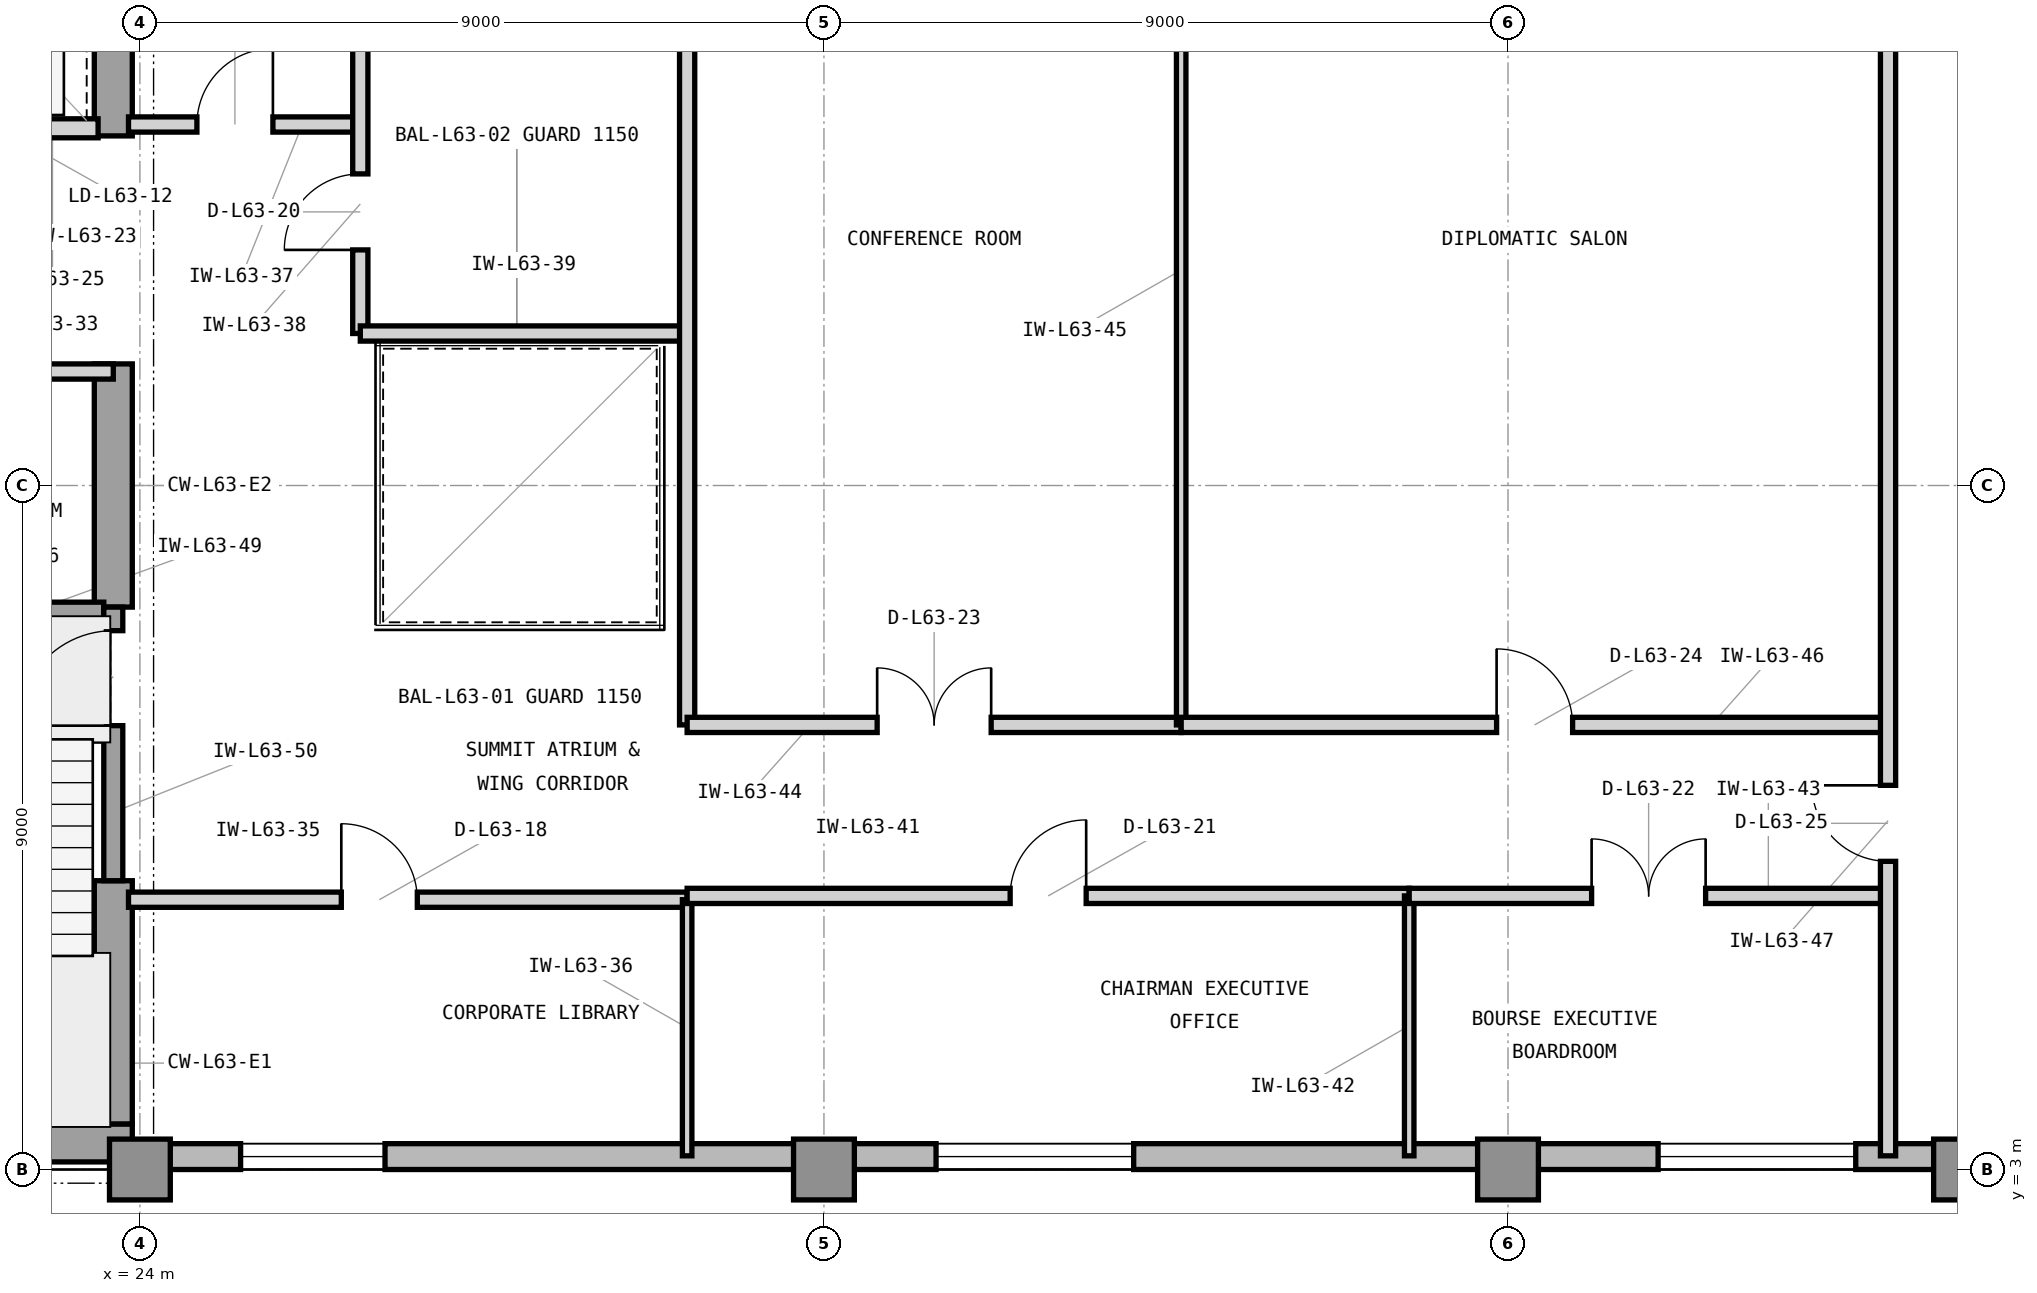
"""IFC4 building model, lengths in metres.
Left out: names, types, materials, properties, quantities, classifications, styles, units other than length and angle.
Written with IfcOpenShell. Run it as: python <this file> out.ifc"""

import sys

from ifc_helpers import new_model, si_unit, direction, frame, frame_2d, origin, origin_2d, place, context, subcontext, project, spatial, rectangle, extrude, element, fill, save


model = new_model("IFC4")
c1 = context("Model", 3, precision=1e-05, world=origin(), true_north=direction((0.0, 1.0)))
c2 = subcontext(c1, "Body", "Model", "MODEL_VIEW")
j1 = project(units=[si_unit("LENGTHUNIT", "METRE"), si_unit("PLANEANGLEUNIT", "RADIAN")], contexts=[c1])
p1 = place(None, origin())
s1 = spatial("IfcSite", under=j1, at=p1, CompositionType="ELEMENT")
p2 = place(p1, origin())
s2 = spatial("IfcBuilding", under=s1, at=p2, CompositionType="ELEMENT")
p3 = place(p2, frame((0.0, 0.0, 258.6)))
s3 = spatial("IfcBuildingStorey", under=s2, at=p3, CompositionType="ELEMENT", Elevation=258.6)
p4 = place(p3, frame((7.475, 3.35, 0.0), z_axis=(0.0, 0.0, 1.0), x_axis=(1.0, 0.0, 0.0)))
e1 = element("IfcWall", 1, at=p4, inside=s3, PredefinedType="SHEAR", context=c2, shape_type="SweptSolid", body=[
    extrude(rectangle(XDim=16.425, YDim=0.5, at=frame_2d((8.212, 0.0))), origin(), (0.0, 0.0, 1.0), 3.9),
])
p5 = place(p3, frame((23.65, 3.6, 0.0), z_axis=(0.0, 0.0, 1.0), x_axis=(0.0, 1.0, 0.0)))
e2 = element("IfcWall", 2, at=p5, inside=s3, PredefinedType="SHEAR", context=c2, shape_type="SweptSolid", body=[
    extrude(rectangle(XDim=3.2, YDim=0.5, at=frame_2d((1.6, 0.0))), origin(), (0.0, 0.0, 1.0), 3.9),
])
p6 = place(p3, frame((23.65, 10.4, 0.0), z_axis=(0.0, 0.0, 1.0), x_axis=(0.0, 1.0, 0.0)))
e3 = element("IfcWall", 3, at=p6, inside=s3, PredefinedType="SHEAR", context=c2, shape_type="SweptSolid", body=[
    extrude(rectangle(XDim=3.2, YDim=0.5, at=frame_2d((1.6, 0.0))), origin(), (0.0, 0.0, 1.0), 3.9),
])
p7 = place(p3, frame((23.65, 16.6, 0.0), z_axis=(0.0, 0.0, 1.0), x_axis=(0.0, 1.0, 0.0)))
e4 = element("IfcWall", 4, at=p7, inside=s3, PredefinedType="SHEAR", context=c2, shape_type="SweptSolid", body=[
    extrude(rectangle(XDim=4.05, YDim=0.5, at=frame_2d((2.025, 0.0))), origin(), (0.0, 0.0, 1.0), 3.9),
])
for number, where, z_axis, x_axis in (
    (5, (24.0, 3.0, 0.0), (0.0, 0.0, 1.0), (1.0, 0.0, 0.0)),
    (6, (33.0, 3.0, 0.0), (0.0, 0.0, 1.0), (1.0, 0.0, 0.0)),
    (7, (42.0, 3.0, 0.0), (0.0, 0.0, 1.0), (1.0, 0.0, 0.0)),
    (8, (48.0, 3.0, 0.0), (0.0, 0.0, 1.0), (1.0, 0.0, 0.0)),
):
    element("IfcColumn", number, at=place(p3, frame(where, z_axis=z_axis, x_axis=x_axis)), inside=s3, PredefinedType="COLUMN", context=c2, shape_type="SweptSolid", body=[
        extrude(rectangle(XDim=0.8, YDim=0.8, at=origin_2d()), origin(), (0.0, 0.0, 1.0), 3.9),
    ])
p8 = place(p3, frame((23.9, 3.17, 0.0), z_axis=(0.0, 0.0, 1.0), x_axis=(1.0, 0.0, 0.0)))
e9 = element("IfcWall", 9, at=p8, inside=s3, PredefinedType="STANDARD", context=c2, shape_type="SweptSolid", body=[
    extrude(rectangle(XDim=28.5, YDim=0.34, at=frame_2d((14.25, 0.0))), origin(), (0.0, 0.0, 1.0), 3.715),
])
p9 = place(p8, frame((1.425, 0.0, 0.8)))
e10 = element("IfcOpeningElement", 10, at=p9, cuts=e9, PredefinedType="OPENING", context=c2, shape_type="SweptSolid", body=[
    extrude(rectangle(XDim=1.9, YDim=2.35, at=frame_2d((0.95, 1.175))), frame((0.0, 0.18, 0.0), z_axis=(0.0, -1.0, 0.0), x_axis=(1.0, 0.0, 0.0)), (0.0, 0.0, 1.0), 0.36),
])
p10 = place(p8, frame((10.575, 0.0, 0.8)))
e11 = element("IfcOpeningElement", 11, at=p10, cuts=e9, PredefinedType="OPENING", context=c2, shape_type="SweptSolid", body=[
    extrude(rectangle(XDim=2.6, YDim=2.35, at=frame_2d((1.3, 1.175))), frame((0.0, 0.18, 0.0), z_axis=(0.0, -1.0, 0.0), x_axis=(1.0, 0.0, 0.0)), (0.0, 0.0, 1.0), 0.36),
])
p11 = place(p8, frame((20.075, 0.0, 0.8)))
e12 = element("IfcOpeningElement", 12, at=p11, cuts=e9, PredefinedType="OPENING", context=c2, shape_type="SweptSolid", body=[
    extrude(rectangle(XDim=2.6, YDim=2.35, at=frame_2d((1.3, 1.175))), frame((0.0, 0.18, 0.0), z_axis=(0.0, -1.0, 0.0), x_axis=(1.0, 0.0, 0.0)), (0.0, 0.0, 1.0), 0.36),
])
p12 = place(p3, frame((21.05, 16.7, 0.0), z_axis=(0.0, 0.0, 1.0), x_axis=(1.0, 0.0, 0.0)))
e13 = element("IfcWall", 13, at=p12, inside=s3, PredefinedType="PARTITIONING", context=c2, shape_type="SweptSolid", body=[
    extrude(rectangle(XDim=2.4, YDim=0.25, at=frame_2d((1.2, 0.0))), origin(), (0.0, 0.0, 1.0), 3.088),
])
p13 = place(p12, frame((0.52, 0.0, 0.0)))
e14 = element("IfcOpeningElement", 14, at=p13, cuts=e13, PredefinedType="OPENING", context=c2, shape_type="SweptSolid", body=[
    extrude(rectangle(XDim=1.15, YDim=2.25, at=frame_2d((0.575, 1.125))), frame((0.0, 0.135, 0.0), z_axis=(0.0, -1.0, 0.0), x_axis=(1.0, 0.0, 0.0)), (0.0, 0.0, 1.0), 0.27),
])
p14 = place(p3, frame((18.5, 13.5, 0.0), z_axis=(0.0, 0.0, 1.0), x_axis=(1.0, 0.0, 0.0)))
e15 = element("IfcWall", 15, at=p14, inside=s3, PredefinedType="PARTITIONING", context=c2, shape_type="SweptSolid", body=[
    extrude(rectangle(XDim=5.15, YDim=0.2, at=frame_2d((2.575, 0.0))), origin(), (0.0, 0.0, 1.0), 3.088),
])
p15 = place(p14, frame((2.1, 0.0, 0.0)))
e16 = element("IfcOpeningElement", 16, at=p15, cuts=e15, PredefinedType="OPENING", context=c2, shape_type="SweptSolid", body=[
    extrude(rectangle(XDim=0.95, YDim=2.1, at=frame_2d((0.475, 1.05))), frame((0.0, 0.11, 0.0), z_axis=(0.0, -1.0, 0.0), x_axis=(1.0, 0.0, 0.0)), (0.0, 0.0, 1.0), 0.22),
])
p16 = place(p3, frame((23.85, 6.55, 0.0), z_axis=(0.0, 0.0, 1.0), x_axis=(1.0, 0.0, 0.0)))
e17 = element("IfcWall", 17, at=p16, inside=s3, PredefinedType="PARTITIONING", context=c2, shape_type="SweptSolid", body=[
    extrude(rectangle(XDim=7.35, YDim=0.2, at=frame_2d((3.675, 0.0))), origin(), (0.0, 0.0, 1.0), 3.705),
])
p17 = place(p16, frame((2.8, 0.0, 0.0)))
e18 = element("IfcOpeningElement", 18, at=p17, cuts=e17, PredefinedType="OPENING", context=c2, shape_type="SweptSolid", body=[
    extrude(rectangle(XDim=1.0, YDim=2.15, at=frame_2d((0.5, 1.075))), frame((0.0, 0.11, 0.0), z_axis=(0.0, -1.0, 0.0), x_axis=(1.0, 0.0, 0.0)), (0.0, 0.0, 1.0), 0.22),
])
p18 = place(p3, frame((31.2, 3.18, 0.0), z_axis=(0.0, 0.0, 1.0), x_axis=(0.0, 1.0, 0.0)))
e19 = element("IfcWall", 19, at=p18, inside=s3, PredefinedType="PARTITIONING", context=c2, shape_type="SweptSolid", body=[
    extrude(rectangle(XDim=3.37, YDim=0.125, at=frame_2d((1.685, 0.0))), origin(), (0.0, 0.0, 1.0), 3.705),
])
p19 = place(p3, frame((23.85, 16.75, 0.0), z_axis=(0.0, 0.0, 1.0), x_axis=(1.0, 0.0, 0.0)))
e20 = element("IfcWall", 20, at=p19, inside=s3, PredefinedType="PARTITIONING", context=c2, shape_type="SweptSolid", body=[
    extrude(rectangle(XDim=3.05, YDim=0.2, at=frame_2d((1.525, 0.0))), origin(), (0.0, 0.0, 1.0), 3.705),
])
p20 = place(p19, frame((0.9, 0.0, 0.0)))
e21 = element("IfcOpeningElement", 21, at=p20, cuts=e20, PredefinedType="OPENING", context=c2, shape_type="SweptSolid", body=[
    extrude(rectangle(XDim=1.0, YDim=2.15, at=frame_2d((0.5, 1.075))), frame((0.0, 0.11, 0.0), z_axis=(0.0, -1.0, 0.0), x_axis=(1.0, 0.0, 0.0)), (0.0, 0.0, 1.0), 0.22),
])
p21 = place(p3, frame((26.9, 14.0, 0.0), z_axis=(0.0, 0.0, 1.0), x_axis=(0.0, 1.0, 0.0)))
e22 = element("IfcWall", 22, at=p21, inside=s3, PredefinedType="PARTITIONING", context=c2, shape_type="SweptSolid", body=[
    extrude(rectangle(XDim=6.82, YDim=0.2, at=frame_2d((3.41, 0.0))), origin(), (0.0, 0.0, 1.0), 3.705),
])
p22 = place(p21, frame((1.1, 0.0, 0.0)))
e23 = element("IfcOpeningElement", 23, at=p22, cuts=e22, PredefinedType="OPENING", context=c2, shape_type="SweptSolid", body=[
    extrude(rectangle(XDim=1.0, YDim=2.15, at=frame_2d((0.5, 1.075))), frame((0.0, 0.11, 0.0), z_axis=(0.0, -1.0, 0.0), x_axis=(1.0, 0.0, 0.0)), (0.0, 0.0, 1.0), 0.22),
])
p23 = place(p3, frame((26.9, 14.0, 0.0), z_axis=(0.0, 0.0, 1.0), x_axis=(1.0, 0.0, 0.0)))
e24 = element("IfcWall", 24, at=p23, inside=s3, PredefinedType="PARTITIONING", context=c2, shape_type="SweptSolid", body=[
    extrude(rectangle(XDim=4.3, YDim=0.2, at=frame_2d((2.15, 0.0))), origin(), (0.0, 0.0, 1.0), 3.705),
])
p24 = place(p3, frame((31.2, 8.85, 0.0), z_axis=(0.0, 0.0, 1.0), x_axis=(0.0, 1.0, 0.0)))
e25 = element("IfcWall", 25, at=p24, inside=s3, PredefinedType="PARTITIONING", context=c2, shape_type="SweptSolid", body=[
    extrude(rectangle(XDim=11.97, YDim=0.2, at=frame_2d((5.985, 0.0))), origin(), (0.0, 0.0, 1.0), 3.705),
])
p25 = place(p3, frame((31.2, 6.6, 0.0), z_axis=(0.0, 0.0, 1.0), x_axis=(1.0, 0.0, 0.0)))
e26 = element("IfcWall", 26, at=p25, inside=s3, PredefinedType="PARTITIONING", context=c2, shape_type="SweptSolid", body=[
    extrude(rectangle(XDim=9.5, YDim=0.2, at=frame_2d((4.75, 0.0))), origin(), (0.0, 0.0, 1.0), 3.705),
])
p26 = place(p25, frame((4.25, 0.0, 0.0)))
e27 = element("IfcOpeningElement", 27, at=p26, cuts=e26, PredefinedType="OPENING", context=c2, shape_type="SweptSolid", body=[
    extrude(rectangle(XDim=1.0, YDim=2.15, at=frame_2d((0.5, 1.075))), frame((0.0, 0.11, 0.0), z_axis=(0.0, -1.0, 0.0), x_axis=(1.0, 0.0, 0.0)), (0.0, 0.0, 1.0), 0.22),
])
p27 = place(p3, frame((40.7, 3.18, 0.0), z_axis=(0.0, 0.0, 1.0), x_axis=(0.0, 1.0, 0.0)))
e28 = element("IfcWall", 28, at=p27, inside=s3, PredefinedType="PARTITIONING", context=c2, shape_type="SweptSolid", body=[
    extrude(rectangle(XDim=3.42, YDim=0.125, at=frame_2d((1.71, 0.0))), origin(), (0.0, 0.0, 1.0), 3.705),
])
p28 = place(p3, frame((40.7, 6.6, 0.0), z_axis=(0.0, 0.0, 1.0), x_axis=(1.0, 0.0, 0.0)))
e29 = element("IfcWall", 29, at=p28, inside=s3, PredefinedType="PARTITIONING", context=c2, shape_type="SweptSolid", body=[
    extrude(rectangle(XDim=6.3, YDim=0.2, at=frame_2d((3.15, 0.0))), origin(), (0.0, 0.0, 1.0), 3.705),
])
p29 = place(p28, frame((2.4, 0.0, 0.0)))
e30 = element("IfcOpeningElement", 30, at=p29, cuts=e29, PredefinedType="OPENING", context=c2, shape_type="SweptSolid", body=[
    extrude(rectangle(XDim=1.5, YDim=2.3, at=frame_2d((0.75, 1.15))), frame((0.0, 0.11, 0.0), z_axis=(0.0, -1.0, 0.0), x_axis=(1.0, 0.0, 0.0)), (0.0, 0.0, 1.0), 0.22),
])
p30 = place(p3, frame((31.2, 8.85, 0.0), z_axis=(0.0, 0.0, 1.0), x_axis=(1.0, 0.0, 0.0)))
e31 = element("IfcWall", 31, at=p30, inside=s3, PredefinedType="PARTITIONING", context=c2, shape_type="SweptSolid", body=[
    extrude(rectangle(XDim=6.5, YDim=0.2, at=frame_2d((3.25, 0.0))), origin(), (0.0, 0.0, 1.0), 3.705),
])
p31 = place(p30, frame((2.5, 0.0, 0.0)))
e32 = element("IfcOpeningElement", 32, at=p31, cuts=e31, PredefinedType="OPENING", context=c2, shape_type="SweptSolid", body=[
    extrude(rectangle(XDim=1.5, YDim=2.3, at=frame_2d((0.75, 1.15))), frame((0.0, 0.11, 0.0), z_axis=(0.0, -1.0, 0.0), x_axis=(1.0, 0.0, 0.0)), (0.0, 0.0, 1.0), 0.22),
])
p32 = place(p3, frame((37.7, 8.85, 0.0), z_axis=(0.0, 0.0, 1.0), x_axis=(0.0, 1.0, 0.0)))
e33 = element("IfcWall", 33, at=p32, inside=s3, PredefinedType="PARTITIONING", context=c2, shape_type="SweptSolid", body=[
    extrude(rectangle(XDim=11.97, YDim=0.125, at=frame_2d((5.985, 0.0))), origin(), (0.0, 0.0, 1.0), 3.705),
])
p33 = place(p3, frame((37.7, 8.85, 0.0), z_axis=(0.0, 0.0, 1.0), x_axis=(1.0, 0.0, 0.0)))
e34 = element("IfcWall", 34, at=p33, inside=s3, PredefinedType="PARTITIONING", context=c2, shape_type="SweptSolid", body=[
    extrude(rectangle(XDim=9.3, YDim=0.2, at=frame_2d((4.65, 0.0))), origin(), (0.0, 0.0, 1.0), 3.705),
])
p34 = place(p33, frame((4.15, 0.0, 0.0)))
e35 = element("IfcOpeningElement", 35, at=p34, cuts=e34, PredefinedType="OPENING", context=c2, shape_type="SweptSolid", body=[
    extrude(rectangle(XDim=1.0, YDim=2.15, at=frame_2d((0.5, 1.075))), frame((0.0, 0.11, 0.0), z_axis=(0.0, -1.0, 0.0), x_axis=(1.0, 0.0, 0.0)), (0.0, 0.0, 1.0), 0.22),
])
p35 = place(p3, frame((47.0, 3.18, 0.0), z_axis=(0.0, 0.0, 1.0), x_axis=(0.0, 1.0, 0.0)))
e36 = element("IfcWall", 36, at=p35, inside=s3, PredefinedType="PARTITIONING", context=c2, shape_type="SweptSolid", body=[
    extrude(rectangle(XDim=17.64, YDim=0.2, at=frame_2d((8.82, 0.0))), origin(), (0.0, 0.0, 1.0), 3.705),
])
p36 = place(p35, frame((3.875, 0.0, 0.0)))
e37 = element("IfcOpeningElement", 37, at=p36, cuts=e36, PredefinedType="OPENING", context=c2, shape_type="SweptSolid", body=[
    extrude(rectangle(XDim=1.0, YDim=2.15, at=frame_2d((0.5, 1.075))), frame((0.0, 0.11, 0.0), z_axis=(0.0, -1.0, 0.0), x_axis=(1.0, 0.0, 0.0)), (0.0, 0.0, 1.0), 0.22),
])
p37 = place(p3, frame((19.705, 10.34, 0.0), z_axis=(0.0, 0.0, 1.0), x_axis=(1.0, 0.0, 0.0)))
e38 = element("IfcWall", 38, at=p37, inside=s3, PredefinedType="SHEAR", context=c2, shape_type="SweptSolid", body=[
    extrude(rectangle(XDim=3.82, YDim=0.25, at=frame_2d((1.91, 0.0))), origin(), (0.0, 0.0, 1.0), 3.9),
])
p38 = place(p3, frame((23.65, 6.8, 0.0), z_axis=(0.0, 0.0, 1.0), x_axis=(0.0, 1.0, 0.0)))
e39 = element("IfcWall", 39, at=p38, inside=s3, PredefinedType="SHEAR", context=c2, shape_type="SweptSolid", body=[
    extrude(rectangle(XDim=3.6, YDim=0.25, at=frame_2d((1.8, 0.0))), origin(), (0.0, 0.0, 1.0), 3.9),
])
p39 = place(p38, frame((2.04, 0.0, 0.0)))
e40 = element("IfcOpeningElement", 40, at=p39, cuts=e39, PredefinedType="OPENING", context=c2, shape_type="SweptSolid", body=[
    extrude(rectangle(XDim=1.25, YDim=2.2, at=frame_2d((0.625, 1.1))), frame((0.0, 0.135, 0.0), z_axis=(0.0, -1.0, 0.0), x_axis=(1.0, 0.0, 0.0)), (0.0, 0.0, 1.0), 0.27),
])
p40 = place(p9, origin())
e41 = element("IfcWindow", 41, at=p40, inside=s3, PartitioningType="SINGLE_PANEL", PredefinedType="WINDOW", context=c2, shape_type="SweptSolid", body=[
    extrude(rectangle(XDim=1.9, YDim=2.35, at=frame_2d((0.95, 1.175))), frame((0.0, 0.11, 0.0), z_axis=(0.0, -1.0, 0.0), x_axis=(1.0, 0.0, 0.0)), (0.0, 0.0, 1.0), 0.06),
])
fill(e10, e41)
p41 = place(p10, origin())
e42 = element("IfcWindow", 42, at=p41, inside=s3, PartitioningType="SINGLE_PANEL", PredefinedType="WINDOW", context=c2, shape_type="SweptSolid", body=[
    extrude(rectangle(XDim=2.6, YDim=2.35, at=frame_2d((1.3, 1.175))), frame((0.0, 0.11, 0.0), z_axis=(0.0, -1.0, 0.0), x_axis=(1.0, 0.0, 0.0)), (0.0, 0.0, 1.0), 0.06),
])
fill(e11, e42)
p42 = place(p11, origin())
e43 = element("IfcWindow", 43, at=p42, inside=s3, PartitioningType="SINGLE_PANEL", PredefinedType="WINDOW", context=c2, shape_type="SweptSolid", body=[
    extrude(rectangle(XDim=2.6, YDim=2.35, at=frame_2d((1.3, 1.175))), frame((0.0, 0.11, 0.0), z_axis=(0.0, -1.0, 0.0), x_axis=(1.0, 0.0, 0.0)), (0.0, 0.0, 1.0), 0.06),
])
fill(e12, e43)
p43 = place(p17, origin())
e44 = element("IfcDoor", 44, at=p43, inside=s3, OperationType="SINGLE_SWING_LEFT", PredefinedType="DOOR", context=c2, shape_type="SweptSolid", body=[
    extrude(rectangle(XDim=1.0, YDim=2.15, at=frame_2d((0.5, 1.075))), frame((0.0, 0.025, 0.0), z_axis=(0.0, -1.0, 0.0), x_axis=(1.0, 0.0, 0.0)), (0.0, 0.0, 1.0), 0.05),
])
fill(e18, e44)
p44 = place(p20, origin())
e45 = element("IfcDoor", 45, at=p44, inside=s3, OperationType="SINGLE_SWING_RIGHT", PredefinedType="DOOR", context=c2, shape_type="SweptSolid", body=[
    extrude(rectangle(XDim=1.0, YDim=2.15, at=frame_2d((0.5, 1.075))), frame((0.0, 0.025, 0.0), z_axis=(0.0, -1.0, 0.0), x_axis=(1.0, 0.0, 0.0)), (0.0, 0.0, 1.0), 0.05),
])
fill(e21, e45)
p45 = place(p22, origin())
e46 = element("IfcDoor", 46, at=p45, inside=s3, OperationType="SINGLE_SWING_LEFT", PredefinedType="DOOR", context=c2, shape_type="SweptSolid", body=[
    extrude(rectangle(XDim=1.0, YDim=2.15, at=frame_2d((0.5, 1.075))), frame((0.0, 0.025, 0.0), z_axis=(0.0, -1.0, 0.0), x_axis=(1.0, 0.0, 0.0)), (0.0, 0.0, 1.0), 0.05),
])
fill(e23, e46)
p46 = place(p26, origin())
e47 = element("IfcDoor", 47, at=p46, inside=s3, OperationType="SINGLE_SWING_RIGHT", PredefinedType="DOOR", context=c2, shape_type="SweptSolid", body=[
    extrude(rectangle(XDim=1.0, YDim=2.15, at=frame_2d((0.5, 1.075))), frame((0.0, 0.025, 0.0), z_axis=(0.0, -1.0, 0.0), x_axis=(1.0, 0.0, 0.0)), (0.0, 0.0, 1.0), 0.05),
])
fill(e27, e47)
p47 = place(p29, origin())
e48 = element("IfcDoor", 48, at=p47, inside=s3, OperationType="DOUBLE_DOOR_SINGLE_SWING", PredefinedType="DOOR", context=c2, shape_type="SweptSolid", body=[
    extrude(rectangle(XDim=1.5, YDim=2.3, at=frame_2d((0.75, 1.15))), frame((0.0, 0.025, 0.0), z_axis=(0.0, -1.0, 0.0), x_axis=(1.0, 0.0, 0.0)), (0.0, 0.0, 1.0), 0.05),
])
fill(e30, e48)
p48 = place(p31, origin())
e49 = element("IfcDoor", 49, at=p48, inside=s3, OperationType="DOUBLE_DOOR_SINGLE_SWING", PredefinedType="DOOR", context=c2, shape_type="SweptSolid", body=[
    extrude(rectangle(XDim=1.5, YDim=2.3, at=frame_2d((0.75, 1.15))), frame((0.0, 0.025, 0.0), z_axis=(0.0, -1.0, 0.0), x_axis=(1.0, 0.0, 0.0)), (0.0, 0.0, 1.0), 0.05),
])
fill(e32, e49)
p49 = place(p34, origin())
e50 = element("IfcDoor", 50, at=p49, inside=s3, OperationType="SINGLE_SWING_LEFT", PredefinedType="DOOR", context=c2, shape_type="SweptSolid", body=[
    extrude(rectangle(XDim=1.0, YDim=2.15, at=frame_2d((0.5, 1.075))), frame((0.0, 0.025, 0.0), z_axis=(0.0, -1.0, 0.0), x_axis=(1.0, 0.0, 0.0)), (0.0, 0.0, 1.0), 0.05),
])
fill(e35, e50)
p50 = place(p36, origin())
e51 = element("IfcDoor", 51, at=p50, inside=s3, OperationType="SINGLE_SWING_RIGHT", PredefinedType="DOOR", context=c2, shape_type="SweptSolid", body=[
    extrude(rectangle(XDim=1.0, YDim=2.15, at=frame_2d((0.5, 1.075))), frame((0.0, 0.025, 0.0), z_axis=(0.0, -1.0, 0.0), x_axis=(1.0, 0.0, 0.0)), (0.0, 0.0, 1.0), 0.05),
])
fill(e37, e51)
p51 = place(p39, origin())
e52 = element("IfcDoor", 52, at=p51, inside=s3, OperationType="SINGLE_SWING_LEFT", PredefinedType="DOOR", context=c2, shape_type="SweptSolid", body=[
    extrude(rectangle(XDim=1.25, YDim=2.2, at=frame_2d((0.625, 1.1))), frame((0.0, 0.025, 0.0), z_axis=(0.0, -1.0, 0.0), x_axis=(1.0, 0.0, 0.0)), (0.0, 0.0, 1.0), 0.05),
])
fill(e40, e52)
save(model, sys.argv[1])
